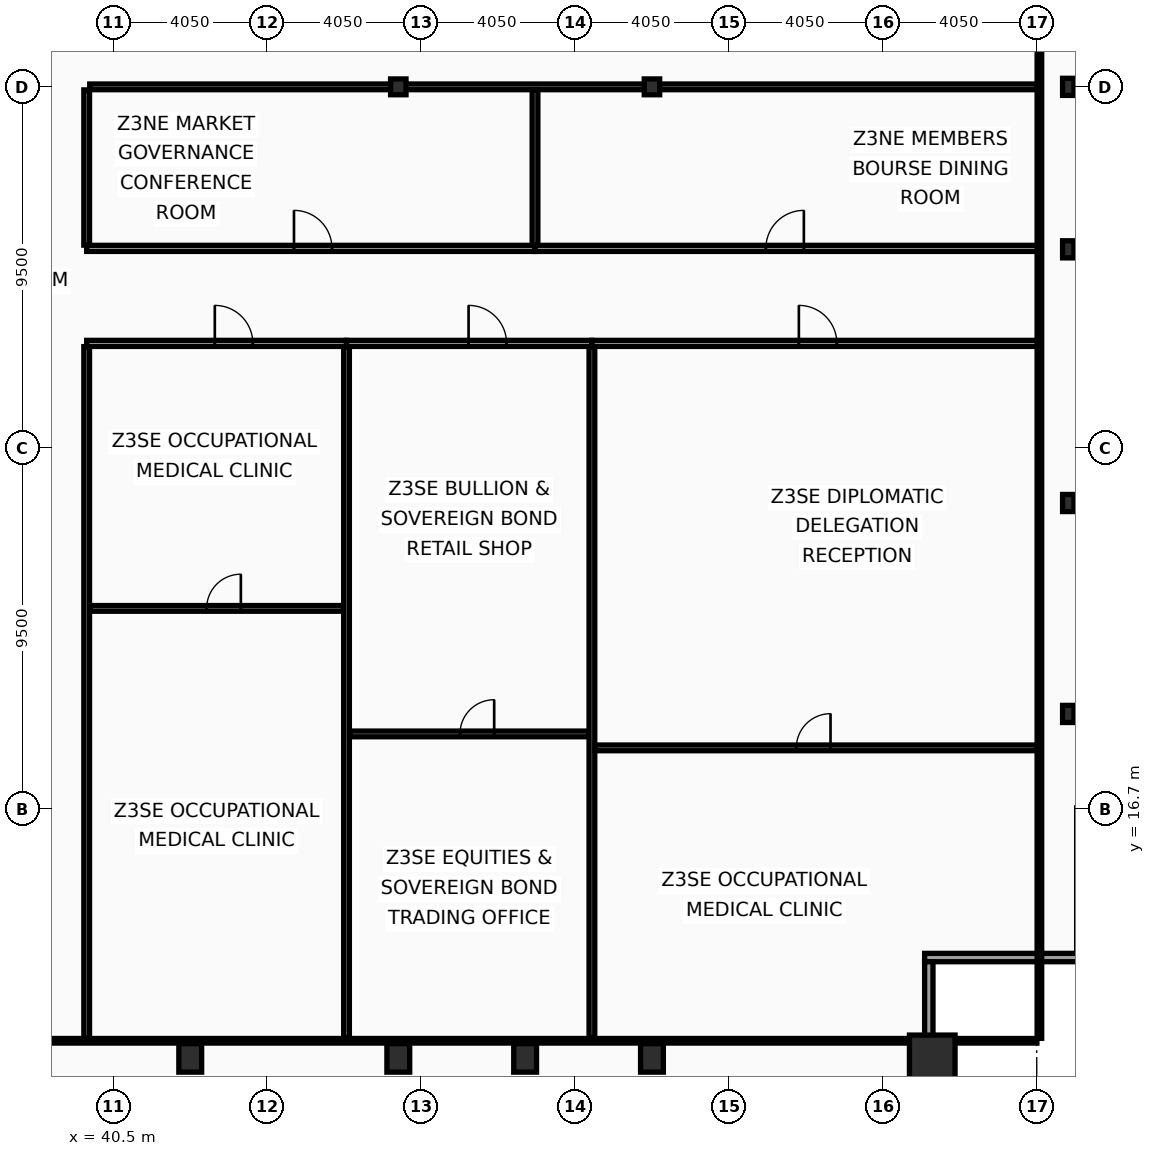
"""IFC4 building model, lengths in metres.
Left out: names, types, materials, properties, quantities, classifications, styles, units other than length and angle.
Written with IfcOpenShell. Run it as: python <this file> out.ifc"""

import sys

from ifc_helpers import new_model, si_unit, direction, frame, frame_2d, origin, origin_2d, place, context, subcontext, project, spatial, rectangle, hollow_rectangle, i_section, extrude, element, fill, save


model = new_model("IFC4")
c1 = context("Model", 3, precision=1e-05, world=origin(), true_north=direction((0.0, 1.0)))
c2 = subcontext(c1, "Body", "Model", "MODEL_VIEW")
j1 = project(units=[si_unit("LENGTHUNIT", "METRE"), si_unit("PLANEANGLEUNIT", "RADIAN")], contexts=[c1])
p1 = place(None, origin())
s1 = spatial("IfcSite", under=j1, at=p1, CompositionType="ELEMENT")
p2 = place(p1, origin())
s2 = spatial("IfcBuilding", under=s1, at=p2, CompositionType="ELEMENT")
p3 = place(p2, frame((0.0, 0.0, 217.4)))
s3 = spatial("IfcBuildingStorey", under=s2, at=p3, CompositionType="ELEMENT", Elevation=217.4)
p4 = place(p3, frame((62.05, 10.15, 0.0), z_axis=(0.0, 0.0, 1.0), x_axis=(1.0, 0.0, 0.0)))
e1 = element("IfcColumn", 1, at=p4, inside=s3, PredefinedType="COLUMN", context=c2, shape_type="SweptSolid", body=[
    extrude(hollow_rectangle(XDim=1.2, YDim=1.2, WallThickness=0.06, at=origin_2d()), origin(), (0.0, 0.0, 1.0), 3.6),
])
for number, where, z_axis, x_axis in (
    (2, (42.525, 10.15, 0.0), (0.0, 0.0, 1.0), (1.0, 0.0, 0.0)),
    (3, (48.0, 10.15, 0.0), (0.0, 0.0, 1.0), (1.0, 0.0, 0.0)),
    (4, (51.337, 10.15, 0.0), (0.0, 0.0, 1.0), (1.0, 0.0, 0.0)),
    (5, (54.675, 10.15, 0.0), (0.0, 0.0, 1.0), (1.0, 0.0, 0.0)),
):
    element("IfcColumn", number, at=place(p3, frame(where, z_axis=z_axis, x_axis=x_axis)), inside=s3, PredefinedType="COLUMN", context=c2, shape_type="SweptSolid", body=[
        extrude(hollow_rectangle(XDim=0.6, YDim=0.75, WallThickness=0.045, at=origin_2d()), origin(), (0.0, 0.0, 1.0), 3.6),
    ])
for number, where, z_axis, x_axis in (
    (6, (65.63, 19.2, 0.0), (0.0, 0.0, 1.0), (1.0, 0.0, 0.0)),
    (7, (65.63, 24.75, 0.0), (0.0, 0.0, 1.0), (1.0, 0.0, 0.0)),
    (8, (65.63, 31.425, 0.0), (0.0, 0.0, 1.0), (1.0, 0.0, 0.0)),
    (9, (65.63, 35.7, 0.0), (0.0, 0.0, 1.0), (1.0, 0.0, 0.0)),
):
    element("IfcColumn", number, at=place(p3, frame(where, z_axis=z_axis, x_axis=x_axis)), inside=s3, PredefinedType="COLUMN", context=c2, shape_type="SweptSolid", body=[
        extrude(i_section(OverallWidth=0.3, OverallDepth=0.45, WebThickness=0.014, FlangeThickness=0.026, at=origin_2d()), origin(), (0.0, 0.0, 1.0), 3.6),
    ])
for number, where, z_axis, x_axis in (
    (10, (48.0, 35.7, 0.0), (0.0, 0.0, 1.0), (1.0, 0.0, 0.0)),
    (11, (54.675, 35.7, 0.0), (0.0, 0.0, 1.0), (1.0, 0.0, 0.0)),
):
    element("IfcColumn", number, at=place(p3, frame(where, z_axis=z_axis, x_axis=x_axis)), inside=s3, PredefinedType="COLUMN", context=c2, shape_type="SweptSolid", body=[
        extrude(i_section(OverallWidth=0.406, OverallDepth=0.416, WebThickness=0.03, FlangeThickness=0.048, at=origin_2d()), origin(), (0.0, 0.0, 1.0), 3.6),
    ])
p5 = place(p3, frame((66.07, 12.79, 0.0), z_axis=(0.0, 0.0, 1.0), x_axis=(-1.0, 0.0, 0.0)))
e12 = element("IfcWall", 12, at=p5, inside=s3, PredefinedType="SOLIDWALL", context=c2, shape_type="SweptSolid", body=[
    extrude(rectangle(XDim=4.22, YDim=0.22, at=frame_2d((2.11, 0.0))), origin(), (0.0, 0.0, 1.0), 2.83),
])
p6 = place(p3, frame((61.96, 12.68, 0.0), z_axis=(0.0, 0.0, 1.0), x_axis=(0.0, -1.0, 0.0)))
e13 = element("IfcWall", 13, at=p6, inside=s3, PredefinedType="SOLIDWALL", context=c2, shape_type="SweptSolid", body=[
    extrude(rectangle(XDim=3.91, YDim=0.22, at=frame_2d((1.955, 0.0))), origin(), (0.0, 0.0, 1.0), 2.83),
])
p7 = place(p3, frame((39.8, 10.665, 0.0), z_axis=(0.0, 0.0, 1.0), x_axis=(0.0, 1.0, 0.0)))
e14 = element("IfcWall", 14, at=p7, inside=s3, PredefinedType="PARTITIONING", context=c2, shape_type="SweptSolid", body=[
    extrude(rectangle(XDim=18.2, YDim=0.15, at=frame_2d((9.1, 0.0))), origin(), (0.0, 0.0, 1.0), 2.98),
])
p8 = place(p3, frame((39.8, 31.535, 0.0), z_axis=(0.0, 0.0, 1.0), x_axis=(0.0, 1.0, 0.0)))
e15 = element("IfcWall", 15, at=p8, inside=s3, PredefinedType="PARTITIONING", context=c2, shape_type="SweptSolid", body=[
    extrude(rectangle(XDim=4.085, YDim=0.15, at=frame_2d((2.042, 0.0))), origin(), (0.0, 0.0, 1.0), 2.98),
])
p9 = place(p3, frame((39.88, 35.7, 0.0), z_axis=(0.0, 0.0, 1.0), x_axis=(1.0, 0.0, 0.0)))
e16 = element("IfcWall", 16, at=p9, inside=s3, PredefinedType="PARTITIONING", context=c2, shape_type="SweptSolid", body=[
    extrude(rectangle(XDim=24.925, YDim=0.15, at=frame_2d((12.462, 0.0))), origin(), (0.0, 0.0, 1.0), 2.78),
])
p10 = place(p3, frame((39.8, 28.95, 0.0), z_axis=(0.0, 0.0, 1.0), x_axis=(1.0, 0.0, 0.0)))
e17 = element("IfcWall", 17, at=p10, inside=s3, PredefinedType="PARTITIONING", context=c2, shape_type="SweptSolid", body=[
    extrude(rectangle(XDim=6.837, YDim=0.16, at=frame_2d((3.418, 0.0))), origin(), (0.0, 0.0, 1.0), 2.78),
])
p11 = place(p10, frame((3.372, 0.0, 0.0)))
e18 = element("IfcOpeningElement", 18, at=p11, cuts=e17, PredefinedType="OPENING", context=c2, shape_type="SweptSolid", body=[
    extrude(rectangle(XDim=1.0, YDim=2.05, at=frame_2d((0.5, 1.025))), frame((0.0, 0.09, 0.0), z_axis=(0.0, -1.0, 0.0), x_axis=(1.0, 0.0, 0.0)), (0.0, 0.0, 1.0), 0.18),
])
p12 = place(p3, frame((39.88, 21.977, 0.0), z_axis=(0.0, 0.0, 1.0), x_axis=(1.0, 0.0, 0.0)))
e19 = element("IfcWall", 19, at=p12, inside=s3, PredefinedType="PARTITIONING", context=c2, shape_type="SweptSolid", body=[
    extrude(rectangle(XDim=6.677, YDim=0.15, at=frame_2d((3.339, 0.0))), origin(), (0.0, 0.0, 1.0), 2.78),
])
p13 = place(p12, frame((3.077, 0.0, 0.0)))
e20 = element("IfcOpeningElement", 20, at=p13, cuts=e19, PredefinedType="OPENING", context=c2, shape_type="SweptSolid", body=[
    extrude(rectangle(XDim=0.9, YDim=2.05, at=frame_2d((0.45, 1.025))), frame((0.0, 0.085, 0.0), z_axis=(0.0, -1.0, 0.0), x_axis=(1.0, 0.0, 0.0)), (0.0, 0.0, 1.0), 0.17),
])
p14 = place(p3, frame((46.637, 28.95, 0.0), z_axis=(0.0, 0.0, 1.0), x_axis=(1.0, 0.0, 0.0)))
e21 = element("IfcWall", 21, at=p14, inside=s3, PredefinedType="PARTITIONING", context=c2, shape_type="SweptSolid", body=[
    extrude(rectangle(XDim=6.458, YDim=0.16, at=frame_2d((3.229, 0.0))), origin(), (0.0, 0.0, 1.0), 2.78),
])
p15 = place(p14, frame((3.212, 0.0, 0.0)))
e22 = element("IfcOpeningElement", 22, at=p15, cuts=e21, PredefinedType="OPENING", context=c2, shape_type="SweptSolid", body=[
    extrude(rectangle(XDim=1.0, YDim=2.05, at=frame_2d((0.5, 1.025))), frame((0.0, 0.09, 0.0), z_axis=(0.0, -1.0, 0.0), x_axis=(1.0, 0.0, 0.0)), (0.0, 0.0, 1.0), 0.18),
])
p16 = place(p3, frame((46.637, 10.665, 0.0), z_axis=(0.0, 0.0, 1.0), x_axis=(0.0, 1.0, 0.0)))
e23 = element("IfcWall", 23, at=p16, inside=s3, PredefinedType="PARTITIONING", context=c2, shape_type="SweptSolid", body=[
    extrude(rectangle(XDim=18.2, YDim=0.15, at=frame_2d((9.1, 0.0))), origin(), (0.0, 0.0, 1.0), 2.98),
])
p17 = place(p3, frame((46.717, 18.674, 0.0), z_axis=(0.0, 0.0, 1.0), x_axis=(1.0, 0.0, 0.0)))
e24 = element("IfcWall", 24, at=p17, inside=s3, PredefinedType="PARTITIONING", context=c2, shape_type="SweptSolid", body=[
    extrude(rectangle(XDim=6.297, YDim=0.15, at=frame_2d((3.149, 0.0))), origin(), (0.0, 0.0, 1.0), 2.78),
])
p18 = place(p17, frame((2.906, 0.0, 0.0)))
e25 = element("IfcOpeningElement", 25, at=p18, cuts=e24, PredefinedType="OPENING", context=c2, shape_type="SweptSolid", body=[
    extrude(rectangle(XDim=0.9, YDim=2.05, at=frame_2d((0.45, 1.025))), frame((0.0, 0.085, 0.0), z_axis=(0.0, -1.0, 0.0), x_axis=(1.0, 0.0, 0.0)), (0.0, 0.0, 1.0), 0.17),
])
p19 = place(p3, frame((53.095, 28.95, 0.0), z_axis=(0.0, 0.0, 1.0), x_axis=(1.0, 0.0, 0.0)))
e26 = element("IfcWall", 26, at=p19, inside=s3, PredefinedType="PARTITIONING", context=c2, shape_type="SweptSolid", body=[
    extrude(rectangle(XDim=11.775, YDim=0.16, at=frame_2d((5.888, 0.0))), origin(), (0.0, 0.0, 1.0), 2.78),
])
p20 = place(p19, frame((5.446, 0.0, 0.0)))
e27 = element("IfcOpeningElement", 27, at=p20, cuts=e26, PredefinedType="OPENING", context=c2, shape_type="SweptSolid", body=[
    extrude(rectangle(XDim=1.0, YDim=2.05, at=frame_2d((0.5, 1.025))), frame((0.0, 0.09, 0.0), z_axis=(0.0, -1.0, 0.0), x_axis=(1.0, 0.0, 0.0)), (0.0, 0.0, 1.0), 0.18),
])
p21 = place(p3, frame((53.095, 10.665, 0.0), z_axis=(0.0, 0.0, 1.0), x_axis=(0.0, 1.0, 0.0)))
e28 = element("IfcWall", 28, at=p21, inside=s3, PredefinedType="PARTITIONING", context=c2, shape_type="SweptSolid", body=[
    extrude(rectangle(XDim=18.2, YDim=0.15, at=frame_2d((9.1, 0.0))), origin(), (0.0, 0.0, 1.0), 2.98),
])
p22 = place(p3, frame((53.175, 18.307, 0.0), z_axis=(0.0, 0.0, 1.0), x_axis=(1.0, 0.0, 0.0)))
e29 = element("IfcWall", 29, at=p22, inside=s3, PredefinedType="PARTITIONING", context=c2, shape_type="SweptSolid", body=[
    extrude(rectangle(XDim=11.63, YDim=0.15, at=frame_2d((5.815, 0.0))), origin(), (0.0, 0.0, 1.0), 2.78),
])
p23 = place(p22, frame((5.299, 0.0, 0.0)))
e30 = element("IfcOpeningElement", 30, at=p23, cuts=e29, PredefinedType="OPENING", context=c2, shape_type="SweptSolid", body=[
    extrude(rectangle(XDim=0.9, YDim=2.05, at=frame_2d((0.45, 1.025))), frame((0.0, 0.085, 0.0), z_axis=(0.0, -1.0, 0.0), x_axis=(1.0, 0.0, 0.0)), (0.0, 0.0, 1.0), 0.17),
])
p24 = place(p3, frame((39.8, 31.45, 0.0), z_axis=(0.0, 0.0, 1.0), x_axis=(1.0, 0.0, 0.0)))
e31 = element("IfcWall", 31, at=p24, inside=s3, PredefinedType="PARTITIONING", context=c2, shape_type="SweptSolid", body=[
    extrude(rectangle(XDim=11.798, YDim=0.16, at=frame_2d((5.899, 0.0))), origin(), (0.0, 0.0, 1.0), 2.78),
])
p25 = place(p24, frame((5.455, 0.0, 0.0)))
e32 = element("IfcOpeningElement", 32, at=p25, cuts=e31, PredefinedType="OPENING", context=c2, shape_type="SweptSolid", body=[
    extrude(rectangle(XDim=1.0, YDim=2.05, at=frame_2d((0.5, 1.025))), frame((0.0, 0.09, 0.0), z_axis=(0.0, -1.0, 0.0), x_axis=(1.0, 0.0, 0.0)), (0.0, 0.0, 1.0), 0.18),
])
p26 = place(p3, frame((51.598, 31.45, 0.0), z_axis=(0.0, 0.0, 1.0), x_axis=(1.0, 0.0, 0.0)))
e33 = element("IfcWall", 33, at=p26, inside=s3, PredefinedType="PARTITIONING", context=c2, shape_type="SweptSolid", body=[
    extrude(rectangle(XDim=13.272, YDim=0.16, at=frame_2d((6.636, 0.0))), origin(), (0.0, 0.0, 1.0), 2.78),
])
p27 = place(p26, frame((6.074, 0.0, 0.0)))
e34 = element("IfcOpeningElement", 34, at=p27, cuts=e33, PredefinedType="OPENING", context=c2, shape_type="SweptSolid", body=[
    extrude(rectangle(XDim=1.0, YDim=2.05, at=frame_2d((0.5, 1.025))), frame((0.0, 0.09, 0.0), z_axis=(0.0, -1.0, 0.0), x_axis=(1.0, 0.0, 0.0)), (0.0, 0.0, 1.0), 0.18),
])
p28 = place(p3, frame((51.598, 31.535, 0.0), z_axis=(0.0, 0.0, 1.0), x_axis=(0.0, 1.0, 0.0)))
e35 = element("IfcWall", 35, at=p28, inside=s3, PredefinedType="PARTITIONING", context=c2, shape_type="SweptSolid", body=[
    extrude(rectangle(XDim=4.085, YDim=0.15, at=frame_2d((2.042, 0.0))), origin(), (0.0, 0.0, 1.0), 2.98),
])
p29 = place(p3, frame((64.87, 10.665, 0.0), z_axis=(0.0, 0.0, 1.0), x_axis=(0.0, 1.0, 0.0)))
e36 = element("IfcWall", 36, at=p29, inside=s3, PredefinedType="PARTITIONING", context=c2, shape_type="SweptSolid", body=[
    extrude(rectangle(XDim=42.11, YDim=0.12, at=frame_2d((21.055, 0.0))), origin(), (0.0, 0.0, 1.0), 2.78),
])
p30 = place(p3, frame((8.095, 10.6, 0.0), z_axis=(0.0, 0.0, 1.0), x_axis=(1.0, 0.0, 0.0)))
e37 = element("IfcWall", 37, at=p30, inside=s3, PredefinedType="PARTITIONING", context=c2, shape_type="SweptSolid", body=[
    extrude(rectangle(XDim=56.71, YDim=0.12, at=frame_2d((28.355, 0.0))), origin(), (0.0, 0.0, 1.0), 2.78),
])
p31 = place(p11, origin())
e38 = element("IfcDoor", 38, at=p31, inside=s3, OperationType="SINGLE_SWING_LEFT", PredefinedType="DOOR", context=c2, shape_type="SweptSolid", body=[
    extrude(rectangle(XDim=1.0, YDim=2.05, at=frame_2d((0.5, 1.025))), frame((0.0, 0.025, 0.0), z_axis=(0.0, -1.0, 0.0), x_axis=(1.0, 0.0, 0.0)), (0.0, 0.0, 1.0), 0.05),
])
fill(e18, e38)
p32 = place(p13, origin())
e39 = element("IfcDoor", 39, at=p32, inside=s3, OperationType="SINGLE_SWING_RIGHT", PredefinedType="DOOR", context=c2, shape_type="SweptSolid", body=[
    extrude(rectangle(XDim=0.9, YDim=2.05, at=frame_2d((0.45, 1.025))), frame((0.0, 0.025, 0.0), z_axis=(0.0, -1.0, 0.0), x_axis=(1.0, 0.0, 0.0)), (0.0, 0.0, 1.0), 0.05),
])
fill(e20, e39)
p33 = place(p15, origin())
e40 = element("IfcDoor", 40, at=p33, inside=s3, OperationType="SINGLE_SWING_LEFT", PredefinedType="DOOR", context=c2, shape_type="SweptSolid", body=[
    extrude(rectangle(XDim=1.0, YDim=2.05, at=frame_2d((0.5, 1.025))), frame((0.0, 0.025, 0.0), z_axis=(0.0, -1.0, 0.0), x_axis=(1.0, 0.0, 0.0)), (0.0, 0.0, 1.0), 0.05),
])
fill(e22, e40)
p34 = place(p18, origin())
e41 = element("IfcDoor", 41, at=p34, inside=s3, OperationType="SINGLE_SWING_RIGHT", PredefinedType="DOOR", context=c2, shape_type="SweptSolid", body=[
    extrude(rectangle(XDim=0.9, YDim=2.05, at=frame_2d((0.45, 1.025))), frame((0.0, 0.025, 0.0), z_axis=(0.0, -1.0, 0.0), x_axis=(1.0, 0.0, 0.0)), (0.0, 0.0, 1.0), 0.05),
])
fill(e25, e41)
p35 = place(p20, origin())
e42 = element("IfcDoor", 42, at=p35, inside=s3, OperationType="SINGLE_SWING_LEFT", PredefinedType="DOOR", context=c2, shape_type="SweptSolid", body=[
    extrude(rectangle(XDim=1.0, YDim=2.05, at=frame_2d((0.5, 1.025))), frame((0.0, 0.025, 0.0), z_axis=(0.0, -1.0, 0.0), x_axis=(1.0, 0.0, 0.0)), (0.0, 0.0, 1.0), 0.05),
])
fill(e27, e42)
p36 = place(p23, origin())
e43 = element("IfcDoor", 43, at=p36, inside=s3, OperationType="SINGLE_SWING_RIGHT", PredefinedType="DOOR", context=c2, shape_type="SweptSolid", body=[
    extrude(rectangle(XDim=0.9, YDim=2.05, at=frame_2d((0.45, 1.025))), frame((0.0, 0.025, 0.0), z_axis=(0.0, -1.0, 0.0), x_axis=(1.0, 0.0, 0.0)), (0.0, 0.0, 1.0), 0.05),
])
fill(e30, e43)
p37 = place(p25, origin())
e44 = element("IfcDoor", 44, at=p37, inside=s3, OperationType="SINGLE_SWING_LEFT", PredefinedType="DOOR", context=c2, shape_type="SweptSolid", body=[
    extrude(rectangle(XDim=1.0, YDim=2.05, at=frame_2d((0.5, 1.025))), frame((0.0, 0.025, 0.0), z_axis=(0.0, -1.0, 0.0), x_axis=(1.0, 0.0, 0.0)), (0.0, 0.0, 1.0), 0.05),
])
fill(e32, e44)
p38 = place(p27, origin())
e45 = element("IfcDoor", 45, at=p38, inside=s3, OperationType="SINGLE_SWING_RIGHT", PredefinedType="DOOR", context=c2, shape_type="SweptSolid", body=[
    extrude(rectangle(XDim=1.0, YDim=2.05, at=frame_2d((0.5, 1.025))), frame((0.0, 0.025, 0.0), z_axis=(0.0, -1.0, 0.0), x_axis=(1.0, 0.0, 0.0)), (0.0, 0.0, 1.0), 0.05),
])
fill(e34, e45)
save(model, sys.argv[1])
